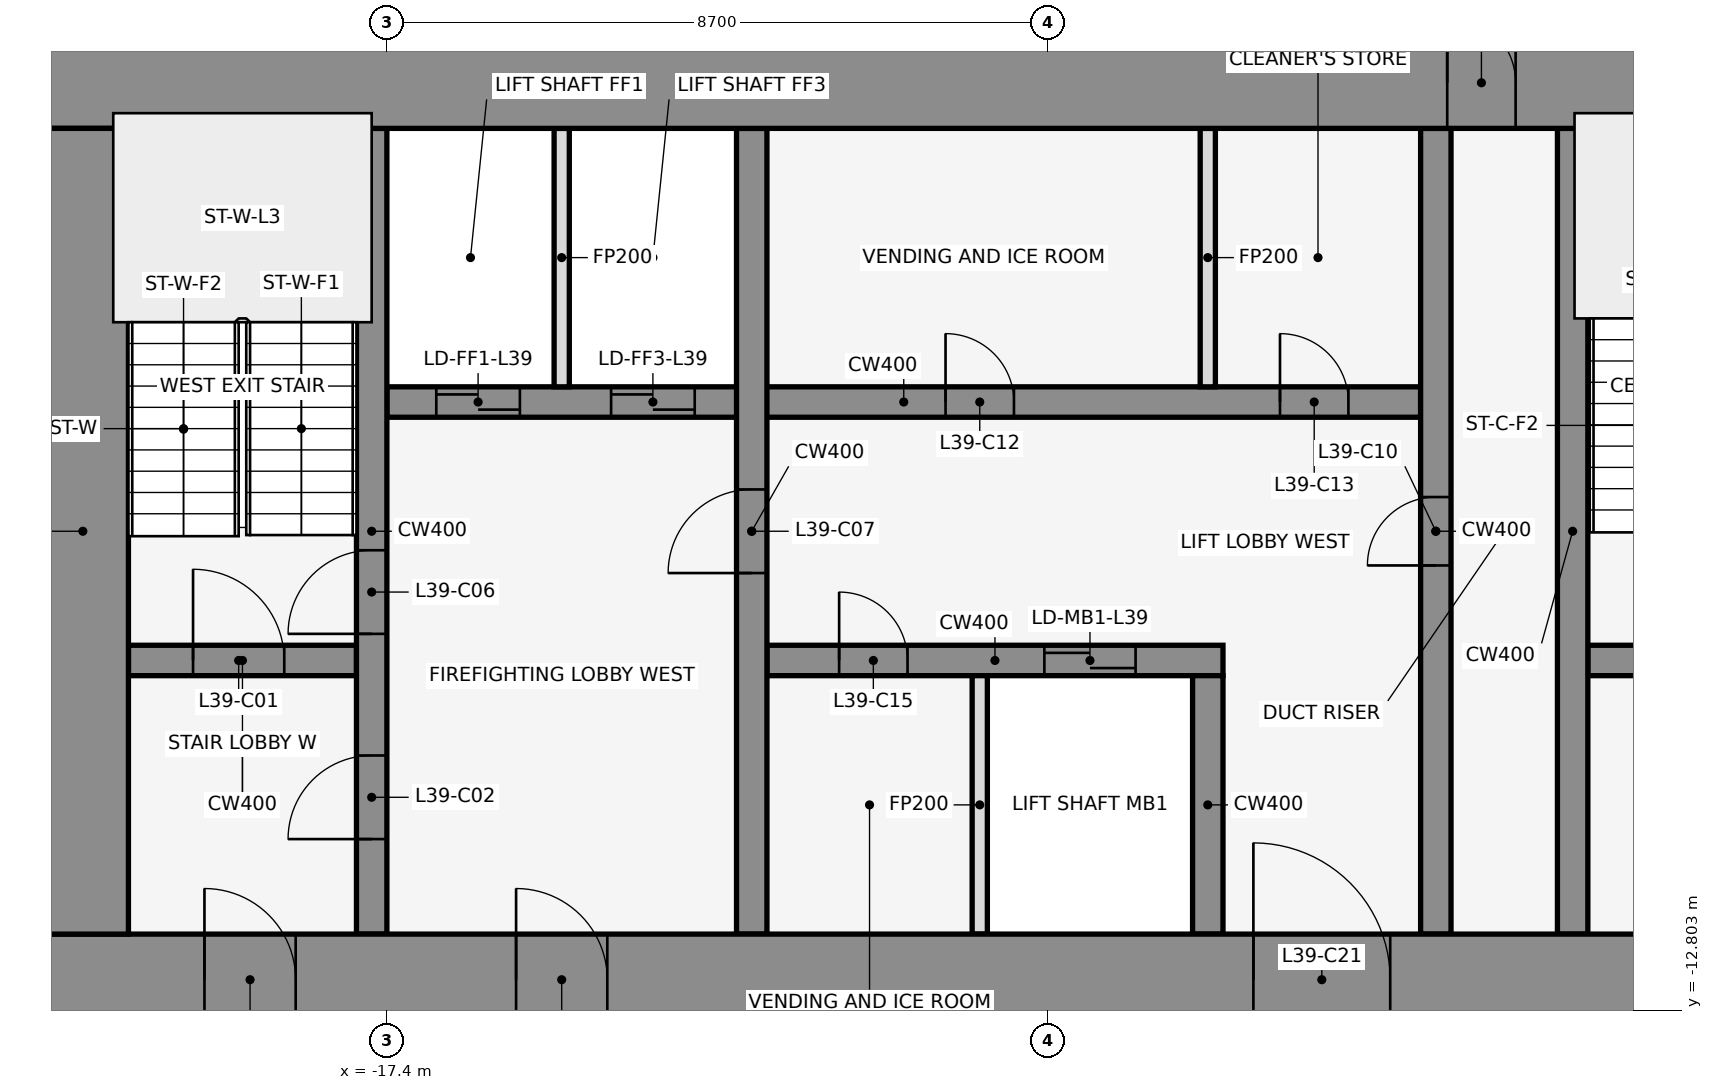
"""IFC4 building model, lengths in metres.
Left out: names, types, materials, properties, quantities, classifications, styles, units other than length and angle.
Written with IfcOpenShell. Run it as: python <this file> out.ifc"""

import sys

from ifc_helpers import new_model, si_unit, direction, frame, frame_2d, origin, place, context, subcontext, project, spatial, rectangle, extrude, element, fill, save


model = new_model("IFC4")
c1 = context("Model", 3, precision=1e-05, world=origin(), true_north=direction((0.0, 1.0)))
c2 = subcontext(c1, "Body", "Model", "MODEL_VIEW")
j1 = project(units=[si_unit("LENGTHUNIT", "METRE"), si_unit("PLANEANGLEUNIT", "RADIAN")], contexts=[c1])
p1 = place(None, origin())
s1 = spatial("IfcSite", under=j1, at=p1, CompositionType="ELEMENT")
p2 = place(p1, origin())
s2 = spatial("IfcBuilding", under=s1, at=p2, CompositionType="ELEMENT")
p3 = place(p2, frame((0.0, 0.0, 177.3)))
s3 = spatial("IfcBuildingStorey", under=s2, at=p3, CompositionType="ELEMENT", Elevation=177.3)
for number, where, z_axis, x_axis in (
    (1, (-0.068, -0.105, 0.0), (0.0, 0.0, 1.0), (-0.84, 0.543, 0.0)),
    (2, (-14.599, 1.08, 0.0), (0.0, 0.0, 1.0), (-0.84, -0.543, 0.0)),
):
    element("IfcWall", number, at=place(p3, frame(where, z_axis=z_axis, x_axis=x_axis)), inside=s3, PredefinedType="STANDARD", context=c2, shape_type="SweptSolid", body=[
        extrude(rectangle(XDim=2.183, YDim=0.25, at=frame_2d((1.091, 0.0))), origin(), (0.0, 0.0, 1.0), 3.95),
    ])
p4 = place(p3, frame((-20.8, -8.2, 0.0), z_axis=(0.0, 0.0, 1.0), x_axis=(1.0, 0.0, 0.0)))
e3 = element("IfcWall", 3, at=p4, inside=s3, PredefinedType="SHEAR", context=c2, shape_type="SweptSolid", body=[
    extrude(rectangle(XDim=3.0, YDim=0.4, at=frame_2d((1.5, 0.0))), origin(), (0.0, 0.0, 1.0), 4.1),
])
p5 = place(p4, frame((0.85, 0.0, 0.0)))
e4 = element("IfcOpeningElement", 4, at=p5, cuts=e3, PredefinedType="OPENING", context=c2, shape_type="SweptSolid", body=[
    extrude(rectangle(XDim=1.2, YDim=2.1, at=frame_2d((0.6, 1.05))), frame((0.0, 0.212, 0.0), z_axis=(0.0, -1.0, 0.0), x_axis=(1.0, 0.0, 0.0)), (0.0, 0.0, 1.0), 0.424),
])
p6 = place(p3, frame((-12.4, -8.2, 0.0), z_axis=(0.0, 0.0, 1.0), x_axis=(1.0, 0.0, 0.0)))
e5 = element("IfcWall", 5, at=p6, inside=s3, PredefinedType="SHEAR", context=c2, shape_type="SweptSolid", body=[
    extrude(rectangle(XDim=6.0, YDim=0.4, at=frame_2d((3.0, 0.0))), origin(), (0.0, 0.0, 1.0), 4.1),
])
p7 = place(p6, frame((3.65, 0.0, 0.0)))
e6 = element("IfcOpeningElement", 6, at=p7, cuts=e5, PredefinedType="OPENING", context=c2, shape_type="SweptSolid", body=[
    extrude(rectangle(XDim=1.2, YDim=2.1, at=frame_2d((0.6, 1.05))), frame((0.0, 0.212, 0.0), z_axis=(0.0, -1.0, 0.0), x_axis=(1.0, 0.0, 0.0)), (0.0, 0.0, 1.0), 0.424),
])
p8 = place(p6, frame((0.95, 0.0, 0.0)))
e7 = element("IfcOpeningElement", 7, at=p8, cuts=e5, PredefinedType="OPENING", context=c2, shape_type="SweptSolid", body=[
    extrude(rectangle(XDim=0.9, YDim=2.1, at=frame_2d((0.45, 1.05))), frame((0.0, 0.212, 0.0), z_axis=(0.0, -1.0, 0.0), x_axis=(1.0, 0.0, 0.0)), (0.0, 0.0, 1.0), 0.424),
])
p9 = place(p3, frame((-1.6, -8.2, 0.0), z_axis=(0.0, 0.0, 1.0), x_axis=(1.0, 0.0, 0.0)))
e8 = element("IfcWall", 8, at=p9, inside=s3, PredefinedType="SHEAR", context=c2, shape_type="SweptSolid", body=[
    extrude(rectangle(XDim=3.2, YDim=0.4, at=frame_2d((1.6, 0.0))), origin(), (0.0, 0.0, 1.0), 4.1),
])
p10 = place(p9, frame((1.05, 0.0, 0.0)))
e9 = element("IfcOpeningElement", 9, at=p10, cuts=e8, PredefinedType="OPENING", context=c2, shape_type="SweptSolid", body=[
    extrude(rectangle(XDim=1.2, YDim=2.1, at=frame_2d((0.6, 1.05))), frame((0.0, 0.212, 0.0), z_axis=(0.0, -1.0, 0.0), x_axis=(1.0, 0.0, 0.0)), (0.0, 0.0, 1.0), 0.424),
])
p11 = place(p3, frame((-17.4, -4.8, 0.0), z_axis=(0.0, 0.0, 1.0), x_axis=(1.0, 0.0, 0.0)))
e10 = element("IfcWall", 10, at=p11, inside=s3, PredefinedType="SHEAR", context=c2, shape_type="SweptSolid", body=[
    extrude(rectangle(XDim=13.6, YDim=0.4, at=frame_2d((6.8, 0.0))), origin(), (0.0, 0.0, 1.0), 4.1),
])
p12 = place(p11, frame((0.65, 0.0, 0.0)))
e11 = element("IfcOpeningElement", 11, at=p12, cuts=e10, PredefinedType="OPENING", context=c2, shape_type="SweptSolid", body=[
    extrude(rectangle(XDim=1.1, YDim=2.1, at=frame_2d((0.55, 1.05))), frame((0.0, 0.212, 0.0), z_axis=(0.0, -1.0, 0.0), x_axis=(1.0, 0.0, 0.0)), (0.0, 0.0, 1.0), 0.424),
])
p13 = place(p11, frame((2.95, 0.0, 0.0)))
e12 = element("IfcOpeningElement", 12, at=p13, cuts=e10, PredefinedType="OPENING", context=c2, shape_type="SweptSolid", body=[
    extrude(rectangle(XDim=1.1, YDim=2.1, at=frame_2d((0.55, 1.05))), frame((0.0, 0.212, 0.0), z_axis=(0.0, -1.0, 0.0), x_axis=(1.0, 0.0, 0.0)), (0.0, 0.0, 1.0), 0.424),
])
p14 = place(p11, frame((7.35, 0.0, 0.0)))
e13 = element("IfcOpeningElement", 13, at=p14, cuts=e10, PredefinedType="OPENING", context=c2, shape_type="SweptSolid", body=[
    extrude(rectangle(XDim=0.9, YDim=2.1, at=frame_2d((0.45, 1.05))), frame((0.0, 0.212, 0.0), z_axis=(0.0, -1.0, 0.0), x_axis=(1.0, 0.0, 0.0)), (0.0, 0.0, 1.0), 0.424),
])
p15 = place(p11, frame((11.75, 0.0, 0.0)))
e14 = element("IfcOpeningElement", 14, at=p15, cuts=e10, PredefinedType="OPENING", context=c2, shape_type="SweptSolid", body=[
    extrude(rectangle(XDim=0.9, YDim=2.1, at=frame_2d((0.45, 1.05))), frame((0.0, 0.212, 0.0), z_axis=(0.0, -1.0, 0.0), x_axis=(1.0, 0.0, 0.0)), (0.0, 0.0, 1.0), 0.424),
])
p16 = place(p3, frame((-17.6, -11.8, 0.0), z_axis=(0.0, 0.0, 1.0), x_axis=(0.0, 1.0, 0.0)))
e15 = element("IfcWall", 15, at=p16, inside=s3, PredefinedType="SHEAR", context=c2, shape_type="SweptSolid", body=[
    extrude(rectangle(XDim=10.6, YDim=0.4, at=frame_2d((5.3, 0.0))), origin(), (0.0, 0.0, 1.0), 4.1),
])
p17 = place(p16, frame((1.25, 0.0, 0.0)))
e16 = element("IfcOpeningElement", 16, at=p17, cuts=e15, PredefinedType="OPENING", context=c2, shape_type="SweptSolid", body=[
    extrude(rectangle(XDim=1.1, YDim=2.1, at=frame_2d((0.55, 1.05))), frame((0.0, 0.212, 0.0), z_axis=(0.0, -1.0, 0.0), x_axis=(1.0, 0.0, 0.0)), (0.0, 0.0, 1.0), 0.424),
])
p18 = place(p16, frame((3.95, 0.0, 0.0)))
e17 = element("IfcOpeningElement", 17, at=p18, cuts=e15, PredefinedType="OPENING", context=c2, shape_type="SweptSolid", body=[
    extrude(rectangle(XDim=1.1, YDim=2.1, at=frame_2d((0.55, 1.05))), frame((0.0, 0.212, 0.0), z_axis=(0.0, -1.0, 0.0), x_axis=(1.0, 0.0, 0.0)), (0.0, 0.0, 1.0), 0.424),
])
p19 = place(p3, frame((-15.1, -4.6, 0.0), z_axis=(0.0, 0.0, 1.0), x_axis=(0.0, 1.0, 0.0)))
e18 = element("IfcWall", 18, at=p19, inside=s3, PredefinedType="PARTITIONING", context=c2, shape_type="SweptSolid", body=[
    extrude(rectangle(XDim=3.4, YDim=0.2, at=frame_2d((1.7, 0.0))), origin(), (0.0, 0.0, 1.0), 2.84),
])
p20 = place(p3, frame((-12.6, -11.8, 0.0), z_axis=(0.0, 0.0, 1.0), x_axis=(0.0, 1.0, 0.0)))
e19 = element("IfcWall", 19, at=p20, inside=s3, PredefinedType="SHEAR", context=c2, shape_type="SweptSolid", body=[
    extrude(rectangle(XDim=10.6, YDim=0.4, at=frame_2d((5.3, 0.0))), origin(), (0.0, 0.0, 1.0), 4.1),
])
p21 = place(p20, frame((4.75, 0.0, 0.0)))
e20 = element("IfcOpeningElement", 20, at=p21, cuts=e19, PredefinedType="OPENING", context=c2, shape_type="SweptSolid", body=[
    extrude(rectangle(XDim=1.1, YDim=2.1, at=frame_2d((0.55, 1.05))), frame((0.0, 0.212, 0.0), z_axis=(0.0, -1.0, 0.0), x_axis=(1.0, 0.0, 0.0)), (0.0, 0.0, 1.0), 0.424),
])
p22 = place(p3, frame((-9.6, -11.8, 0.0), z_axis=(0.0, 0.0, 1.0), x_axis=(0.0, 1.0, 0.0)))
e21 = element("IfcWall", 21, at=p22, inside=s3, PredefinedType="PARTITIONING", context=c2, shape_type="SweptSolid", body=[
    extrude(rectangle(XDim=3.4, YDim=0.2, at=frame_2d((1.7, 0.0))), origin(), (0.0, 0.0, 1.0), 2.84),
])
p23 = place(p3, frame((-6.6, -11.8, 0.0), z_axis=(0.0, 0.0, 1.0), x_axis=(0.0, 1.0, 0.0)))
e22 = element("IfcWall", 22, at=p23, inside=s3, PredefinedType="SHEAR", context=c2, shape_type="SweptSolid", body=[
    extrude(rectangle(XDim=3.4, YDim=0.4, at=frame_2d((1.7, 0.0))), origin(), (0.0, 0.0, 1.0), 4.1),
])
p24 = place(p3, frame((-6.6, -4.6, 0.0), z_axis=(0.0, 0.0, 1.0), x_axis=(0.0, 1.0, 0.0)))
e23 = element("IfcWall", 23, at=p24, inside=s3, PredefinedType="PARTITIONING", context=c2, shape_type="SweptSolid", body=[
    extrude(rectangle(XDim=3.4, YDim=0.2, at=frame_2d((1.7, 0.0))), origin(), (0.0, 0.0, 1.0), 2.84),
])
p25 = place(p3, frame((-3.6, -11.8, 0.0), z_axis=(0.0, 0.0, 1.0), x_axis=(0.0, 1.0, 0.0)))
e24 = element("IfcWall", 24, at=p25, inside=s3, PredefinedType="SHEAR", context=c2, shape_type="SweptSolid", body=[
    extrude(rectangle(XDim=10.6, YDim=0.4, at=frame_2d((5.3, 0.0))), origin(), (0.0, 0.0, 1.0), 4.1),
])
p26 = place(p25, frame((4.85, 0.0, 0.0)))
e25 = element("IfcOpeningElement", 25, at=p26, cuts=e24, PredefinedType="OPENING", context=c2, shape_type="SweptSolid", body=[
    extrude(rectangle(XDim=0.9, YDim=2.1, at=frame_2d((0.45, 1.05))), frame((0.0, 0.212, 0.0), z_axis=(0.0, -1.0, 0.0), x_axis=(1.0, 0.0, 0.0)), (0.0, 0.0, 1.0), 0.424),
])
p27 = place(p3, frame((-1.8, -11.8, 0.0), z_axis=(0.0, 0.0, 1.0), x_axis=(0.0, 1.0, 0.0)))
e26 = element("IfcWall", 26, at=p27, inside=s3, PredefinedType="SHEAR", context=c2, shape_type="SweptSolid", body=[
    extrude(rectangle(XDim=10.6, YDim=0.4, at=frame_2d((5.3, 0.0))), origin(), (0.0, 0.0, 1.0), 4.1),
])
p28 = place(p3, frame((-22.0, -0.6, 0.0), z_axis=(0.0, 0.0, 1.0), x_axis=(1.0, 0.0, 0.0)))
e27 = element("IfcWall", 27, at=p28, inside=s3, PredefinedType="SHEAR", context=c2, shape_type="SweptSolid", body=[
    extrude(rectangle(XDim=44.0, YDim=1.2, at=frame_2d((22.0, 0.0))), origin(), (0.0, 0.0, 1.0), 4.1),
])
p29 = place(p28, frame((18.55, 0.0, 0.0)))
e28 = element("IfcOpeningElement", 28, at=p29, cuts=e27, PredefinedType="OPENING", context=c2, shape_type="SweptSolid", body=[
    extrude(rectangle(XDim=0.9, YDim=2.1, at=frame_2d((0.45, 1.05))), frame((0.0, 0.612, 0.0), z_axis=(0.0, -1.0, 0.0), x_axis=(1.0, 0.0, 0.0)), (0.0, 0.0, 1.0), 1.224),
])
p30 = place(p28, frame((24.55, 0.0, 0.0)))
e29 = element("IfcOpeningElement", 29, at=p30, cuts=e27, PredefinedType="OPENING", context=c2, shape_type="SweptSolid", body=[
    extrude(rectangle(XDim=0.9, YDim=2.1, at=frame_2d((0.45, 1.05))), frame((0.0, 0.612, 0.0), z_axis=(0.0, -1.0, 0.0), x_axis=(1.0, 0.0, 0.0)), (0.0, 0.0, 1.0), 1.224),
])
p31 = place(p3, frame((-22.0, -12.4, 0.0), z_axis=(0.0, 0.0, 1.0), x_axis=(1.0, 0.0, 0.0)))
e30 = element("IfcWall", 30, at=p31, inside=s3, PredefinedType="SHEAR", context=c2, shape_type="SweptSolid", body=[
    extrude(rectangle(XDim=44.0, YDim=1.2, at=frame_2d((22.0, 0.0))), origin(), (0.0, 0.0, 1.0), 4.1),
])
p32 = place(p31, frame((2.2, 0.0, 0.0)))
e31 = element("IfcOpeningElement", 31, at=p32, cuts=e30, PredefinedType="OPENING", context=c2, shape_type="SweptSolid", body=[
    extrude(rectangle(XDim=1.2, YDim=2.1, at=frame_2d((0.6, 1.05))), frame((0.0, 0.612, 0.0), z_axis=(0.0, -1.0, 0.0), x_axis=(1.0, 0.0, 0.0)), (0.0, 0.0, 1.0), 1.224),
])
p33 = place(p31, frame((21.4, 0.0, 0.0)))
e32 = element("IfcOpeningElement", 32, at=p33, cuts=e30, PredefinedType="OPENING", context=c2, shape_type="SweptSolid", body=[
    extrude(rectangle(XDim=1.2, YDim=2.1, at=frame_2d((0.6, 1.05))), frame((0.0, 0.612, 0.0), z_axis=(0.0, -1.0, 0.0), x_axis=(1.0, 0.0, 0.0)), (0.0, 0.0, 1.0), 1.224),
])
p34 = place(p31, frame((40.6, 0.0, 0.0)))
e33 = element("IfcOpeningElement", 33, at=p34, cuts=e30, PredefinedType="OPENING", context=c2, shape_type="SweptSolid", body=[
    extrude(rectangle(XDim=1.2, YDim=2.1, at=frame_2d((0.6, 1.05))), frame((0.0, 0.612, 0.0), z_axis=(0.0, -1.0, 0.0), x_axis=(1.0, 0.0, 0.0)), (0.0, 0.0, 1.0), 1.224),
])
p35 = place(p31, frame((16.0, 0.0, 0.0)))
e34 = element("IfcOpeningElement", 34, at=p35, cuts=e30, PredefinedType="OPENING", context=c2, shape_type="SweptSolid", body=[
    extrude(rectangle(XDim=1.8, YDim=2.1, at=frame_2d((0.9, 1.05))), frame((0.0, 0.612, 0.0), z_axis=(0.0, -1.0, 0.0), x_axis=(1.0, 0.0, 0.0)), (0.0, 0.0, 1.0), 1.224),
])
p36 = place(p31, frame((6.3, 0.0, 0.0)))
e35 = element("IfcOpeningElement", 35, at=p36, cuts=e30, PredefinedType="OPENING", context=c2, shape_type="SweptSolid", body=[
    extrude(rectangle(XDim=1.2, YDim=2.1, at=frame_2d((0.6, 1.05))), frame((0.0, 0.612, 0.0), z_axis=(0.0, -1.0, 0.0), x_axis=(1.0, 0.0, 0.0)), (0.0, 0.0, 1.0), 1.224),
])
p37 = place(p31, frame((26.2, 0.0, 0.0)))
e36 = element("IfcOpeningElement", 36, at=p37, cuts=e30, PredefinedType="OPENING", context=c2, shape_type="SweptSolid", body=[
    extrude(rectangle(XDim=1.8, YDim=2.1, at=frame_2d((0.9, 1.05))), frame((0.0, 0.612, 0.0), z_axis=(0.0, -1.0, 0.0), x_axis=(1.0, 0.0, 0.0)), (0.0, 0.0, 1.0), 1.224),
])
p38 = place(p31, frame((36.5, 0.0, 0.0)))
e37 = element("IfcOpeningElement", 37, at=p38, cuts=e30, PredefinedType="OPENING", context=c2, shape_type="SweptSolid", body=[
    extrude(rectangle(XDim=1.2, YDim=2.1, at=frame_2d((0.6, 1.05))), frame((0.0, 0.612, 0.0), z_axis=(0.0, -1.0, 0.0), x_axis=(1.0, 0.0, 0.0)), (0.0, 0.0, 1.0), 1.224),
])
p39 = place(p3, frame((-21.4, -11.8, 0.0), z_axis=(0.0, 0.0, 1.0), x_axis=(0.0, 1.0, 0.0)))
e38 = element("IfcWall", 38, at=p39, inside=s3, PredefinedType="SHEAR", context=c2, shape_type="SweptSolid", body=[
    extrude(rectangle(XDim=10.6, YDim=1.2, at=frame_2d((5.3, 0.0))), origin(), (0.0, 0.0, 1.0), 4.1),
])
p40 = place(p5, origin())
e39 = element("IfcDoor", 39, at=p40, inside=s3, OperationType="SINGLE_SWING_LEFT", PredefinedType="DOOR", context=c2, shape_type="SweptSolid", body=[
    extrude(rectangle(XDim=1.2, YDim=2.1, at=frame_2d((0.6, 1.05))), frame((0.0, 0.025, 0.0), z_axis=(0.0, -1.0, 0.0), x_axis=(1.0, 0.0, 0.0)), (0.0, 0.0, 1.0), 0.05),
])
fill(e4, e39)
p41 = place(p17, frame((1.1, 0.0, 0.0), z_axis=(0.0, 0.0, 1.0), x_axis=(-1.0, 0.0, 0.0)))
e40 = element("IfcDoor", 40, at=p41, inside=s3, OperationType="SINGLE_SWING_LEFT", PredefinedType="DOOR", context=c2, shape_type="SweptSolid", body=[
    extrude(rectangle(XDim=1.1, YDim=2.1, at=frame_2d((0.55, 1.05))), frame((0.0, 0.025, 0.0), z_axis=(0.0, -1.0, 0.0), x_axis=(1.0, 0.0, 0.0)), (0.0, 0.0, 1.0), 0.05),
])
fill(e16, e40)
p42 = place(p12, origin())
e41 = element("IfcDoor", 41, at=p42, inside=s3, OperationType="DOUBLE_DOOR_SLIDING", PredefinedType="DOOR", context=c2, shape_type="SweptSolid", body=[
    extrude(rectangle(XDim=1.1, YDim=2.1, at=frame_2d((0.55, 1.05))), frame((0.0, 0.025, 0.0), z_axis=(0.0, -1.0, 0.0), x_axis=(1.0, 0.0, 0.0)), (0.0, 0.0, 1.0), 0.05),
])
fill(e11, e41)
p43 = place(p13, origin())
e42 = element("IfcDoor", 42, at=p43, inside=s3, OperationType="DOUBLE_DOOR_SLIDING", PredefinedType="DOOR", context=c2, shape_type="SweptSolid", body=[
    extrude(rectangle(XDim=1.1, YDim=2.1, at=frame_2d((0.55, 1.05))), frame((0.0, 0.025, 0.0), z_axis=(0.0, -1.0, 0.0), x_axis=(1.0, 0.0, 0.0)), (0.0, 0.0, 1.0), 0.05),
])
fill(e12, e42)
p44 = place(p7, origin())
e43 = element("IfcDoor", 43, at=p44, inside=s3, OperationType="DOUBLE_DOOR_SLIDING", PredefinedType="DOOR", context=c2, shape_type="SweptSolid", body=[
    extrude(rectangle(XDim=1.2, YDim=2.1, at=frame_2d((0.6, 1.05))), frame((0.0, 0.025, 0.0), z_axis=(0.0, -1.0, 0.0), x_axis=(1.0, 0.0, 0.0)), (0.0, 0.0, 1.0), 0.05),
])
fill(e6, e43)
p45 = place(p18, frame((1.1, 0.0, 0.0), z_axis=(0.0, 0.0, 1.0), x_axis=(-1.0, 0.0, 0.0)))
e44 = element("IfcDoor", 44, at=p45, inside=s3, OperationType="SINGLE_SWING_LEFT", PredefinedType="DOOR", context=c2, shape_type="SweptSolid", body=[
    extrude(rectangle(XDim=1.1, YDim=2.1, at=frame_2d((0.55, 1.05))), frame((0.0, 0.025, 0.0), z_axis=(0.0, -1.0, 0.0), x_axis=(1.0, 0.0, 0.0)), (0.0, 0.0, 1.0), 0.05),
])
fill(e17, e44)
p46 = place(p21, origin())
e45 = element("IfcDoor", 45, at=p46, inside=s3, OperationType="SINGLE_SWING_LEFT", PredefinedType="DOOR", context=c2, shape_type="SweptSolid", body=[
    extrude(rectangle(XDim=1.1, YDim=2.1, at=frame_2d((0.55, 1.05))), frame((0.0, 0.025, 0.0), z_axis=(0.0, -1.0, 0.0), x_axis=(1.0, 0.0, 0.0)), (0.0, 0.0, 1.0), 0.05),
])
fill(e20, e45)
p47 = place(p26, frame((0.9, 0.0, 0.0), z_axis=(0.0, 0.0, 1.0), x_axis=(-1.0, 0.0, 0.0)))
e46 = element("IfcDoor", 46, at=p47, inside=s3, OperationType="SINGLE_SWING_LEFT", PredefinedType="DOOR", context=c2, shape_type="SweptSolid", body=[
    extrude(rectangle(XDim=0.9, YDim=2.1, at=frame_2d((0.45, 1.05))), frame((0.0, 0.025, 0.0), z_axis=(0.0, -1.0, 0.0), x_axis=(1.0, 0.0, 0.0)), (0.0, 0.0, 1.0), 0.05),
])
fill(e25, e46)
p48 = place(p14, origin())
e47 = element("IfcDoor", 47, at=p48, inside=s3, OperationType="SINGLE_SWING_RIGHT", PredefinedType="DOOR", context=c2, shape_type="SweptSolid", body=[
    extrude(rectangle(XDim=0.9, YDim=2.1, at=frame_2d((0.45, 1.05))), frame((0.0, 0.025, 0.0), z_axis=(0.0, -1.0, 0.0), x_axis=(1.0, 0.0, 0.0)), (0.0, 0.0, 1.0), 0.05),
])
fill(e13, e47)
p49 = place(p15, origin())
e48 = element("IfcDoor", 48, at=p49, inside=s3, OperationType="SINGLE_SWING_LEFT", PredefinedType="DOOR", context=c2, shape_type="SweptSolid", body=[
    extrude(rectangle(XDim=0.9, YDim=2.1, at=frame_2d((0.45, 1.05))), frame((0.0, 0.025, 0.0), z_axis=(0.0, -1.0, 0.0), x_axis=(1.0, 0.0, 0.0)), (0.0, 0.0, 1.0), 0.05),
])
fill(e14, e48)
p50 = place(p8, frame((0.9, 0.0, 0.0), z_axis=(0.0, 0.0, 1.0), x_axis=(-1.0, 0.0, 0.0)))
e49 = element("IfcDoor", 49, at=p50, inside=s3, OperationType="SINGLE_SWING_RIGHT", PredefinedType="DOOR", context=c2, shape_type="SweptSolid", body=[
    extrude(rectangle(XDim=0.9, YDim=2.1, at=frame_2d((0.45, 1.05))), frame((0.0, 0.025, 0.0), z_axis=(0.0, -1.0, 0.0), x_axis=(1.0, 0.0, 0.0)), (0.0, 0.0, 1.0), 0.05),
])
fill(e7, e49)
p51 = place(p29, origin())
e50 = element("IfcDoor", 50, at=p51, inside=s3, OperationType="SINGLE_SWING_LEFT", PredefinedType="DOOR", context=c2, shape_type="SweptSolid", body=[
    extrude(rectangle(XDim=0.9, YDim=2.1, at=frame_2d((0.45, 1.05))), frame((0.0, 0.025, 0.0), z_axis=(0.0, -1.0, 0.0), x_axis=(1.0, 0.0, 0.0)), (0.0, 0.0, 1.0), 0.05),
])
fill(e28, e50)
p52 = place(p32, frame((1.2, 0.0, 0.0), z_axis=(0.0, 0.0, 1.0), x_axis=(-1.0, 0.0, 0.0)))
e51 = element("IfcDoor", 51, at=p52, inside=s3, OperationType="SINGLE_SWING_RIGHT", PredefinedType="DOOR", context=c2, shape_type="SweptSolid", body=[
    extrude(rectangle(XDim=1.2, YDim=2.1, at=frame_2d((0.6, 1.05))), frame((0.0, 0.025, 0.0), z_axis=(0.0, -1.0, 0.0), x_axis=(1.0, 0.0, 0.0)), (0.0, 0.0, 1.0), 0.05),
])
fill(e31, e51)
p53 = place(p35, origin())
e52 = element("IfcDoor", 52, at=p53, inside=s3, OperationType="SINGLE_SWING_LEFT", PredefinedType="DOOR", context=c2, shape_type="SweptSolid", body=[
    extrude(rectangle(XDim=1.8, YDim=2.1, at=frame_2d((0.9, 1.05))), frame((0.0, 0.025, 0.0), z_axis=(0.0, -1.0, 0.0), x_axis=(1.0, 0.0, 0.0)), (0.0, 0.0, 1.0), 0.05),
])
fill(e34, e52)
p54 = place(p36, frame((1.2, 0.0, 0.0), z_axis=(0.0, 0.0, 1.0), x_axis=(-1.0, 0.0, 0.0)))
e53 = element("IfcDoor", 53, at=p54, inside=s3, OperationType="SINGLE_SWING_RIGHT", PredefinedType="DOOR", context=c2, shape_type="SweptSolid", body=[
    extrude(rectangle(XDim=1.2, YDim=2.1, at=frame_2d((0.6, 1.05))), frame((0.0, 0.025, 0.0), z_axis=(0.0, -1.0, 0.0), x_axis=(1.0, 0.0, 0.0)), (0.0, 0.0, 1.0), 0.05),
])
fill(e35, e53)
save(model, sys.argv[1])
